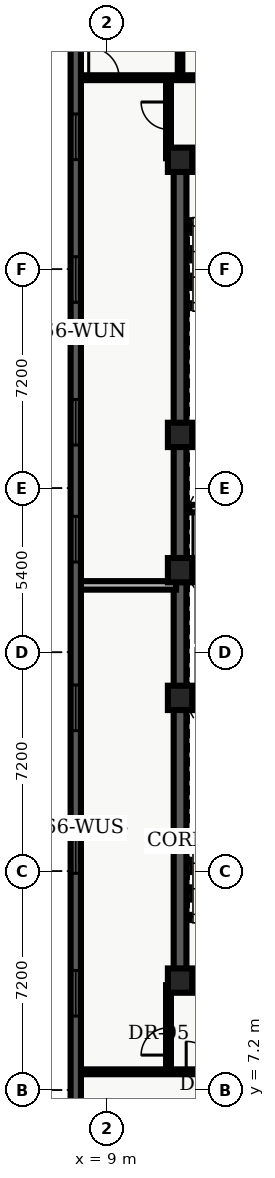
"""IFC4 building model, lengths in metres.
Left out: names, types, materials, properties, quantities, classifications, styles, units other than length and angle.
Written with IfcOpenShell. Run it as: python <this file> out.ifc"""

import sys

from ifc_helpers import new_model, entity, si_unit, converted_unit, direction, frame, origin_with_axes, origin_2d_with_axis, place, context, subcontext, project, spatial, polyline, rectangle, outline, extrude, element, fill, save


model = new_model("IFC4")
c1 = context("Model", 3, precision=1e-05, world=origin_with_axes(), true_north=direction((0.0, 1.0)))
c2 = subcontext(c1, "Body", "Model", "MODEL_VIEW")
j1 = project(units=[si_unit("LENGTHUNIT", "METRE"), converted_unit("PLANEANGLEUNIT", "DEGREE", entity("IfcPlaneAngleMeasure", 0.017), si_unit("PLANEANGLEUNIT", "RADIAN"), dimensions=[0, 0, 0, 0, 0, 0, 0])], contexts=[c1])
p1 = place(None, origin_with_axes())
s1 = spatial("IfcSite", under=j1, at=p1, CompositionType="ELEMENT")
p2 = place(p1, origin_with_axes())
s2 = spatial("IfcBuilding", under=s1, at=p2, CompositionType="ELEMENT")
p3 = place(p2, frame((0.0, 0.0, 268.5), z_axis=(0.0, 0.0, 1.0), x_axis=(1.0, 0.0, 0.0)))
s3 = spatial("IfcBuildingStorey", under=s2, at=p3, CompositionType="ELEMENT", Elevation=268.5)
p4 = place(p3, frame((11.4, 10.8, 0.0), z_axis=(0.0, 0.0, 1.0), x_axis=(0.0, 1.0, 0.0)))
e1 = element("IfcWall", 1, at=p4, inside=s3, PredefinedType="SHEAR", context=c2, shape_type="SweptSolid", body=[
    extrude(outline(polyline([(0.0, -0.21), (27.0, -0.21), (27.0, 0.21), (0.0, 0.21), (0.0, -0.21)])), origin_with_axes(), (0.0, 0.0, 1.0), 3.66),
])
p5 = place(p3, frame((11.4, 10.8, 0.0), z_axis=(0.0, 0.0, 1.0), x_axis=(1.0, 0.0, 0.0)))
e2 = element("IfcWall", 2, at=p5, inside=s3, PredefinedType="SHEAR", context=c2, shape_type="SweptSolid", body=[
    extrude(outline(polyline([(0.0, -0.21), (7.2, -0.21), (7.2, 0.21), (0.0, 0.21), (0.0, -0.21)])), origin_with_axes(), (0.0, 0.0, 1.0), 3.66),
])
p6 = place(p5, frame((2.625, 0.0, 0.0), z_axis=(0.0, 0.0, 1.0), x_axis=(1.0, 0.0, 0.0)))
e3 = element("IfcOpeningElement", 3, at=p6, cuts=e2, PredefinedType="OPENING", context=c2, shape_type="SweptSolid", body=[
    extrude(rectangle(XDim=1.05, YDim=0.44, at=origin_2d_with_axis()), origin_with_axes(), (0.0, 0.0, 1.0), 2.15),
])
p7 = place(p3, frame((11.4, 37.8, 0.0), z_axis=(0.0, 0.0, 1.0), x_axis=(1.0, 0.0, 0.0)))
e4 = element("IfcWall", 4, at=p7, inside=s3, PredefinedType="SHEAR", context=c2, shape_type="SweptSolid", body=[
    extrude(outline(polyline([(0.0, -0.21), (7.2, -0.21), (7.2, 0.21), (0.0, 0.21), (0.0, -0.21)])), origin_with_axes(), (0.0, 0.0, 1.0), 3.66),
])
p8 = place(p7, frame((2.625, 0.0, 0.0), z_axis=(0.0, 0.0, 1.0), x_axis=(1.0, 0.0, 0.0)))
e5 = element("IfcOpeningElement", 5, at=p8, cuts=e4, PredefinedType="OPENING", context=c2, shape_type="SweptSolid", body=[
    extrude(rectangle(XDim=1.05, YDim=0.44, at=origin_2d_with_axis()), origin_with_axes(), (0.0, 0.0, 1.0), 2.15),
])
for number, where, z_axis, x_axis in (
    (6, (11.61, 19.825, 0.0), (0.0, 0.0, 1.0), (1.0, 0.0, 0.0)),
    (7, (11.61, 28.775, 0.0), (0.0, 0.0, 1.0), (1.0, 0.0, 0.0)),
):
    element("IfcWall", number, at=place(p3, frame(where, z_axis=z_axis, x_axis=x_axis)), inside=s3, PredefinedType="SHEAR", context=c2, shape_type="SweptSolid", body=[
        extrude(outline(polyline([(0.0, -0.125), (6.78, -0.125), (6.78, 0.125), (0.0, 0.125), (0.0, -0.125)])), origin_with_axes(), (0.0, 0.0, 1.0), 3.66),
    ])
p9 = place(p3, frame((11.7, 24.1, 0.0), z_axis=(0.0, 0.0, 1.0), x_axis=(1.0, 0.0, 0.0)))
e8 = element("IfcWall", 8, at=p9, inside=s3, PredefinedType="SOLIDWALL", context=c2, shape_type="SweptSolid", body=[
    extrude(outline(polyline([(0.0, -0.125), (6.6, -0.125), (6.6, 0.125), (0.0, 0.125), (0.0, -0.125)])), origin_with_axes(), (0.0, 0.0, 1.0), 2.7),
])
p10 = place(p9, frame((3.6, 0.0, 0.0), z_axis=(0.0, 0.0, 1.0), x_axis=(1.0, 0.0, 0.0)))
e9 = element("IfcOpeningElement", 9, at=p10, cuts=e8, PredefinedType="OPENING", context=c2, shape_type="SweptSolid", body=[
    extrude(rectangle(XDim=0.9, YDim=0.27, at=origin_2d_with_axis()), origin_with_axes(), (0.0, 0.0, 1.0), 2.15),
])
p11 = place(p9, frame((5.65, 0.0, 0.0), z_axis=(0.0, 0.0, 1.0), x_axis=(1.0, 0.0, 0.0)))
e10 = element("IfcOpeningElement", 10, at=p11, cuts=e8, PredefinedType="OPENING", context=c2, shape_type="SweptSolid", body=[
    extrude(rectangle(XDim=0.9, YDim=0.27, at=origin_2d_with_axis()), origin_with_axes(), (0.0, 0.0, 1.0), 2.15),
])
p12 = place(p3, frame((11.7, 26.325, 0.0), z_axis=(0.0, 0.0, 1.0), x_axis=(1.0, 0.0, 0.0)))
e11 = element("IfcWall", 11, at=p12, inside=s3, PredefinedType="SOLIDWALL", context=c2, shape_type="SweptSolid", body=[
    extrude(outline(polyline([(0.0, -0.125), (6.6, -0.125), (6.6, 0.125), (0.0, 0.125), (0.0, -0.125)])), origin_with_axes(), (0.0, 0.0, 1.0), 2.7),
])
p13 = place(p12, frame((3.5, 0.0, 0.0), z_axis=(0.0, 0.0, 1.0), x_axis=(1.0, 0.0, 0.0)))
e12 = element("IfcOpeningElement", 12, at=p13, cuts=e11, PredefinedType="OPENING", context=c2, shape_type="SweptSolid", body=[
    extrude(rectangle(XDim=0.9, YDim=0.27, at=origin_2d_with_axis()), origin_with_axes(), (0.0, 0.0, 1.0), 2.15),
])
for number, where, z_axis, x_axis in (
    (13, (11.4, 10.8, 0.0), (0.0, 0.0, 1.0), (1.0, 0.0, 0.0)),
    (14, (11.4, 20.1, 0.0), (0.0, 0.0, 1.0), (1.0, 0.0, 0.0)),
    (15, (11.4, 24.3, 0.0), (0.0, 0.0, 1.0), (1.0, 0.0, 0.0)),
    (16, (11.4, 28.75, 0.0), (0.0, 0.0, 1.0), (1.0, 0.0, 0.0)),
    (17, (11.4, 37.8, 0.0), (0.0, 0.0, 1.0), (1.0, 0.0, 0.0)),
):
    element("IfcColumn", number, at=place(p3, frame(where, z_axis=z_axis, x_axis=x_axis)), inside=s3, PredefinedType="COLUMN", context=c2, shape_type="SweptSolid", body=[
        extrude(rectangle(XDim=0.8, YDim=0.8, at=origin_2d_with_axis()), origin_with_axes(), (0.0, 0.0, 1.0), 3.9),
    ])
p14 = place(p3, frame((8.135, 7.8, 0.0), z_axis=(0.0, 0.0, 1.0), x_axis=(1.0, 0.0, 0.0)))
e18 = element("IfcWall", 18, at=p14, inside=s3, PredefinedType="PARTITIONING", context=c2, shape_type="SweptSolid", body=[
    extrude(outline(polyline([(0.0, -0.08), (12.165, -0.08), (12.165, 0.08), (0.0, 0.08), (0.0, -0.08)])), origin_with_axes(), (0.0, 0.0, 1.0), 2.7),
])
p15 = place(p14, frame((3.967, 0.0, 0.0), z_axis=(0.0, 0.0, 1.0), x_axis=(1.0, 0.0, 0.0)))
e19 = element("IfcOpeningElement", 19, at=p15, cuts=e18, PredefinedType="OPENING", context=c2, shape_type="SweptSolid", body=[
    extrude(rectangle(XDim=1.0, YDim=0.18, at=origin_2d_with_axis()), origin_with_axes(), (0.0, 0.0, 1.0), 2.15),
])
p16 = place(p14, frame((8.768, 0.0, 0.0), z_axis=(0.0, 0.0, 1.0), x_axis=(1.0, 0.0, 0.0)))
e20 = element("IfcOpeningElement", 20, at=p16, cuts=e18, PredefinedType="OPENING", context=c2, shape_type="SweptSolid", body=[
    extrude(rectangle(XDim=1.0, YDim=0.18, at=origin_2d_with_axis()), origin_with_axes(), (0.0, 0.0, 1.0), 2.15),
])
p17 = place(p3, frame((8.135, 40.5, 0.0), z_axis=(0.0, 0.0, 1.0), x_axis=(1.0, 0.0, 0.0)))
e21 = element("IfcWall", 21, at=p17, inside=s3, PredefinedType="PARTITIONING", context=c2, shape_type="SweptSolid", body=[
    extrude(outline(polyline([(0.0, -0.08), (23.93, -0.08), (23.93, 0.08), (0.0, 0.08), (0.0, -0.08)])), origin_with_axes(), (0.0, 0.0, 1.0), 2.7),
])
p18 = place(p17, frame((0.76, 0.0, 0.0), z_axis=(0.0, 0.0, 1.0), x_axis=(1.0, 0.0, 0.0)))
e22 = element("IfcOpeningElement", 22, at=p18, cuts=e21, PredefinedType="OPENING", context=c2, shape_type="SweptSolid", body=[
    extrude(rectangle(XDim=1.0, YDim=0.18, at=origin_2d_with_axis()), origin_with_axes(), (0.0, 0.0, 1.0), 2.15),
])
p19 = place(p17, frame((4.39, 0.0, 0.0), z_axis=(0.0, 0.0, 1.0), x_axis=(1.0, 0.0, 0.0)))
e23 = element("IfcOpeningElement", 23, at=p19, cuts=e21, PredefinedType="OPENING", context=c2, shape_type="SweptSolid", body=[
    extrude(rectangle(XDim=1.0, YDim=0.18, at=origin_2d_with_axis()), origin_with_axes(), (0.0, 0.0, 1.0), 2.15),
])
p20 = place(p17, frame((7.051, 0.0, 0.0), z_axis=(0.0, 0.0, 1.0), x_axis=(1.0, 0.0, 0.0)))
e24 = element("IfcOpeningElement", 24, at=p20, cuts=e21, PredefinedType="OPENING", context=c2, shape_type="SweptSolid", body=[
    extrude(rectangle(XDim=1.0, YDim=0.18, at=origin_2d_with_axis()), origin_with_axes(), (0.0, 0.0, 1.0), 2.15),
])
p21 = place(p17, frame((10.006, 0.0, 0.0), z_axis=(0.0, 0.0, 1.0), x_axis=(1.0, 0.0, 0.0)))
e25 = element("IfcOpeningElement", 25, at=p21, cuts=e21, PredefinedType="OPENING", context=c2, shape_type="SweptSolid", body=[
    extrude(rectangle(XDim=1.0, YDim=0.18, at=origin_2d_with_axis()), origin_with_axes(), (0.0, 0.0, 1.0), 2.15),
])
p22 = place(p3, frame((11.02, 7.8, 0.0), z_axis=(0.0, 0.0, 1.0), x_axis=(0.0, 1.0, 0.0)))
e26 = element("IfcWall", 26, at=p22, inside=s3, PredefinedType="PARTITIONING", context=c2, shape_type="SweptSolid", body=[
    extrude(outline(polyline([(0.0, -0.08), (2.85, -0.08), (2.85, 0.08), (0.0, 0.08), (0.0, -0.08)])), origin_with_axes(), (0.0, 0.0, 1.0), 2.7),
])
p23 = place(p22, frame((1.0, 0.0, 0.0), z_axis=(0.0, 0.0, 1.0), x_axis=(1.0, 0.0, 0.0)))
e27 = element("IfcOpeningElement", 27, at=p23, cuts=e26, PredefinedType="OPENING", context=c2, shape_type="SweptSolid", body=[
    extrude(rectangle(XDim=0.9, YDim=0.18, at=origin_2d_with_axis()), origin_with_axes(), (0.0, 0.0, 1.0), 2.15),
])
p24 = place(p3, frame((11.02, 37.85, 0.0), z_axis=(0.0, 0.0, 1.0), x_axis=(0.0, 1.0, 0.0)))
e28 = element("IfcWall", 28, at=p24, inside=s3, PredefinedType="PARTITIONING", context=c2, shape_type="SweptSolid", body=[
    extrude(outline(polyline([(0.0, -0.08), (2.65, -0.08), (2.65, 0.08), (0.0, 0.08), (0.0, -0.08)])), origin_with_axes(), (0.0, 0.0, 1.0), 2.7),
])
p25 = place(p24, frame((1.4, 0.0, 0.0), z_axis=(0.0, 0.0, 1.0), x_axis=(1.0, 0.0, 0.0)))
e29 = element("IfcOpeningElement", 29, at=p25, cuts=e28, PredefinedType="OPENING", context=c2, shape_type="SweptSolid", body=[
    extrude(rectangle(XDim=0.9, YDim=0.18, at=origin_2d_with_axis()), origin_with_axes(), (0.0, 0.0, 1.0), 2.15),
])
p26 = place(p3, frame((8.135, 23.8, 0.0), z_axis=(0.0, 0.0, 1.0), x_axis=(1.0, 0.0, 0.0)))
e30 = element("IfcWall", 30, at=p26, inside=s3, PredefinedType="PARTITIONING", context=c2, shape_type="SweptSolid", body=[
    extrude(outline(polyline([(0.0, -0.14), (3.135, -0.14), (3.135, 0.14), (0.0, 0.14), (0.0, -0.14)])), origin_with_axes(), (0.0, 0.0, 1.0), 2.7),
])
p27 = place(p3, frame((11.4, 40.6, 0.0), z_axis=(0.0, 0.0, 1.0), x_axis=(0.0, 1.0, 0.0)))
e31 = element("IfcWall", 31, at=p27, inside=s3, PredefinedType="PARTITIONING", context=c2, shape_type="SweptSolid", body=[
    extrude(outline(polyline([(0.0, -0.075), (5.42, -0.075), (5.42, 0.075), (0.0, 0.075), (0.0, -0.075)])), origin_with_axes(), (0.0, 0.0, 1.0), 2.7),
])
p28 = place(p3, frame((7.97, 2.74, 0.0), z_axis=(0.0, 0.0, 1.0), x_axis=(0.0, 1.0, 0.0)))
e32 = element("IfcWall", 32, at=p28, inside=s3, PredefinedType="SOLIDWALL", context=c2, shape_type="SweptSolid", body=[
    extrude(outline(polyline([(0.0, -0.17), (43.46, -0.17), (43.46, 0.17), (0.0, 0.17), (0.0, -0.17)])), origin_with_axes(), (0.0, 0.0, 1.0), 3.66),
])
p29 = place(p28, frame((2.948, 0.0, 0.45), z_axis=(0.0, 0.0, 1.0), x_axis=(1.0, 0.0, 0.0)))
e33 = element("IfcOpeningElement", 33, at=p29, cuts=e32, PredefinedType="OPENING", context=c2, shape_type="SweptSolid", body=[
    extrude(rectangle(XDim=1.5, YDim=0.36, at=origin_2d_with_axis()), origin_with_axes(), (0.0, 0.0, 1.0), 2.1),
])
p30 = place(p28, frame((7.643, 0.0, 0.45), z_axis=(0.0, 0.0, 1.0), x_axis=(1.0, 0.0, 0.0)))
e34 = element("IfcOpeningElement", 34, at=p30, cuts=e32, PredefinedType="OPENING", context=c2, shape_type="SweptSolid", body=[
    extrude(rectangle(XDim=1.5, YDim=0.36, at=origin_2d_with_axis()), origin_with_axes(), (0.0, 0.0, 1.0), 2.1),
])
p31 = place(p28, frame((12.339, 0.0, 0.45), z_axis=(0.0, 0.0, 1.0), x_axis=(1.0, 0.0, 0.0)))
e35 = element("IfcOpeningElement", 35, at=p31, cuts=e32, PredefinedType="OPENING", context=c2, shape_type="SweptSolid", body=[
    extrude(rectangle(XDim=1.5, YDim=0.36, at=origin_2d_with_axis()), origin_with_axes(), (0.0, 0.0, 1.0), 2.1),
])
p32 = place(p28, frame((17.034, 0.0, 0.45), z_axis=(0.0, 0.0, 1.0), x_axis=(1.0, 0.0, 0.0)))
e36 = element("IfcOpeningElement", 36, at=p32, cuts=e32, PredefinedType="OPENING", context=c2, shape_type="SweptSolid", body=[
    extrude(rectangle(XDim=1.5, YDim=0.36, at=origin_2d_with_axis()), origin_with_axes(), (0.0, 0.0, 1.0), 2.1),
])
p33 = place(p28, frame((22.58, 0.0, 0.45), z_axis=(0.0, 0.0, 1.0), x_axis=(1.0, 0.0, 0.0)))
e37 = element("IfcOpeningElement", 37, at=p33, cuts=e32, PredefinedType="OPENING", context=c2, shape_type="SweptSolid", body=[
    extrude(rectangle(XDim=1.5, YDim=0.36, at=origin_2d_with_axis()), origin_with_axes(), (0.0, 0.0, 1.0), 2.1),
])
p34 = place(p28, frame((26.426, 0.0, 0.45), z_axis=(0.0, 0.0, 1.0), x_axis=(1.0, 0.0, 0.0)))
e38 = element("IfcOpeningElement", 38, at=p34, cuts=e32, PredefinedType="OPENING", context=c2, shape_type="SweptSolid", body=[
    extrude(rectangle(XDim=1.5, YDim=0.36, at=origin_2d_with_axis()), origin_with_axes(), (0.0, 0.0, 1.0), 2.1),
])
p35 = place(p28, frame((31.121, 0.0, 0.45), z_axis=(0.0, 0.0, 1.0), x_axis=(1.0, 0.0, 0.0)))
e39 = element("IfcOpeningElement", 39, at=p35, cuts=e32, PredefinedType="OPENING", context=c2, shape_type="SweptSolid", body=[
    extrude(rectangle(XDim=1.5, YDim=0.36, at=origin_2d_with_axis()), origin_with_axes(), (0.0, 0.0, 1.0), 2.1),
])
p36 = place(p28, frame((35.817, 0.0, 0.45), z_axis=(0.0, 0.0, 1.0), x_axis=(1.0, 0.0, 0.0)))
e40 = element("IfcOpeningElement", 40, at=p36, cuts=e32, PredefinedType="OPENING", context=c2, shape_type="SweptSolid", body=[
    extrude(rectangle(XDim=1.5, YDim=0.36, at=origin_2d_with_axis()), origin_with_axes(), (0.0, 0.0, 1.0), 2.1),
])
p37 = place(p28, frame((40.512, 0.0, 0.45), z_axis=(0.0, 0.0, 1.0), x_axis=(1.0, 0.0, 0.0)))
e41 = element("IfcOpeningElement", 41, at=p37, cuts=e32, PredefinedType="OPENING", context=c2, shape_type="SweptSolid", body=[
    extrude(rectangle(XDim=1.5, YDim=0.36, at=origin_2d_with_axis()), origin_with_axes(), (0.0, 0.0, 1.0), 2.1),
])
p38 = place(p22, frame((1.0, 0.0, 0.0), z_axis=(0.0, 0.0, 1.0), x_axis=(1.0, 0.0, 0.0)))
e42 = element("IfcDoor", 42, at=p38, inside=s3, OperationType="SINGLE_SWING_LEFT", PredefinedType="DOOR", context=c2, shape_type="SweptSolid", body=[
    extrude(rectangle(XDim=0.9, YDim=0.09, at=origin_2d_with_axis()), origin_with_axes(), (0.0, 0.0, 1.0), 2.15),
])
fill(e27, e42)
p39 = place(p24, frame((1.4, 0.0, 0.0), z_axis=(0.0, 0.0, 1.0), x_axis=(1.0, 0.0, 0.0)))
e43 = element("IfcDoor", 43, at=p39, inside=s3, OperationType="SINGLE_SWING_RIGHT", PredefinedType="DOOR", context=c2, shape_type="SweptSolid", body=[
    extrude(rectangle(XDim=0.9, YDim=0.09, at=origin_2d_with_axis()), origin_with_axes(), (0.0, 0.0, 1.0), 2.15),
])
fill(e29, e43)
p40 = place(p14, frame((3.967, 0.0, 0.0), z_axis=(0.0, 0.0, 1.0), x_axis=(1.0, 0.0, 0.0)))
e44 = element("IfcDoor", 44, at=p40, inside=s3, OperationType="SINGLE_SWING_LEFT", PredefinedType="DOOR", context=c2, shape_type="SweptSolid", body=[
    extrude(rectangle(XDim=1.0, YDim=0.09, at=origin_2d_with_axis()), origin_with_axes(), (0.0, 0.0, 1.0), 2.15),
])
fill(e19, e44)
p41 = place(p17, frame((0.76, 0.0, 0.0), z_axis=(0.0, 0.0, 1.0), x_axis=(1.0, 0.0, 0.0)))
e45 = element("IfcDoor", 45, at=p41, inside=s3, OperationType="SINGLE_SWING_LEFT", PredefinedType="DOOR", context=c2, shape_type="SweptSolid", body=[
    extrude(rectangle(XDim=1.0, YDim=0.09, at=origin_2d_with_axis()), origin_with_axes(), (0.0, 0.0, 1.0), 2.15),
])
fill(e22, e45)
p42 = place(p28, frame((7.643, 0.0, 0.45), z_axis=(0.0, 0.0, 1.0), x_axis=(1.0, 0.0, 0.0)))
e46 = element("IfcWindow", 46, at=p42, inside=s3, PredefinedType="WINDOW", context=c2, shape_type="SweptSolid", body=[
    extrude(rectangle(XDim=1.5, YDim=0.09, at=origin_2d_with_axis()), origin_with_axes(), (0.0, 0.0, 1.0), 2.1),
])
fill(e34, e46)
p43 = place(p28, frame((12.339, 0.0, 0.45), z_axis=(0.0, 0.0, 1.0), x_axis=(1.0, 0.0, 0.0)))
e47 = element("IfcWindow", 47, at=p43, inside=s3, PredefinedType="WINDOW", context=c2, shape_type="SweptSolid", body=[
    extrude(rectangle(XDim=1.5, YDim=0.09, at=origin_2d_with_axis()), origin_with_axes(), (0.0, 0.0, 1.0), 2.1),
])
fill(e35, e47)
p44 = place(p28, frame((17.034, 0.0, 0.45), z_axis=(0.0, 0.0, 1.0), x_axis=(1.0, 0.0, 0.0)))
e48 = element("IfcWindow", 48, at=p44, inside=s3, PredefinedType="WINDOW", context=c2, shape_type="SweptSolid", body=[
    extrude(rectangle(XDim=1.5, YDim=0.09, at=origin_2d_with_axis()), origin_with_axes(), (0.0, 0.0, 1.0), 2.1),
])
fill(e36, e48)
p45 = place(p28, frame((22.58, 0.0, 0.45), z_axis=(0.0, 0.0, 1.0), x_axis=(1.0, 0.0, 0.0)))
e49 = element("IfcWindow", 49, at=p45, inside=s3, PredefinedType="WINDOW", context=c2, shape_type="SweptSolid", body=[
    extrude(rectangle(XDim=1.5, YDim=0.09, at=origin_2d_with_axis()), origin_with_axes(), (0.0, 0.0, 1.0), 2.1),
])
fill(e37, e49)
p46 = place(p28, frame((26.426, 0.0, 0.45), z_axis=(0.0, 0.0, 1.0), x_axis=(1.0, 0.0, 0.0)))
e50 = element("IfcWindow", 50, at=p46, inside=s3, PredefinedType="WINDOW", context=c2, shape_type="SweptSolid", body=[
    extrude(rectangle(XDim=1.5, YDim=0.09, at=origin_2d_with_axis()), origin_with_axes(), (0.0, 0.0, 1.0), 2.1),
])
fill(e38, e50)
p47 = place(p28, frame((31.121, 0.0, 0.45), z_axis=(0.0, 0.0, 1.0), x_axis=(1.0, 0.0, 0.0)))
e51 = element("IfcWindow", 51, at=p47, inside=s3, PredefinedType="WINDOW", context=c2, shape_type="SweptSolid", body=[
    extrude(rectangle(XDim=1.5, YDim=0.09, at=origin_2d_with_axis()), origin_with_axes(), (0.0, 0.0, 1.0), 2.1),
])
fill(e39, e51)
p48 = place(p28, frame((35.817, 0.0, 0.45), z_axis=(0.0, 0.0, 1.0), x_axis=(1.0, 0.0, 0.0)))
e52 = element("IfcWindow", 52, at=p48, inside=s3, PredefinedType="WINDOW", context=c2, shape_type="SweptSolid", body=[
    extrude(rectangle(XDim=1.5, YDim=0.09, at=origin_2d_with_axis()), origin_with_axes(), (0.0, 0.0, 1.0), 2.1),
])
fill(e40, e52)
save(model, sys.argv[1])
